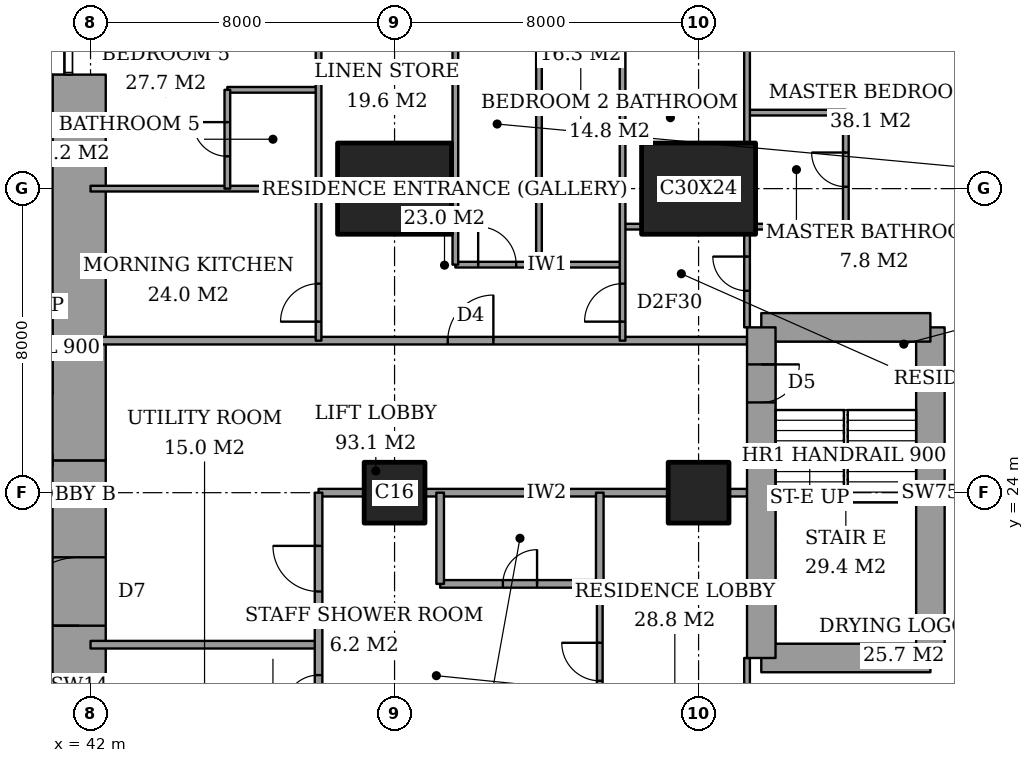
"""IFC4 building model, lengths in metres.
Left out: names, types, materials, properties, quantities, classifications, styles, units other than length and angle.
Written with IfcOpenShell. Run it as: python <this file> out.ifc"""

import sys

from ifc_helpers import new_model, si_unit, direction, frame, frame_2d, origin, origin_2d, place, context, subcontext, project, spatial, rectangle, extrude, element, fill, save


model = new_model("IFC4")
c1 = context("Model", 3, precision=1e-05, world=origin(), true_north=direction((0.0, 1.0)))
c2 = subcontext(c1, "Body", "Model", "MODEL_VIEW")
j1 = project(units=[si_unit("LENGTHUNIT", "METRE"), si_unit("PLANEANGLEUNIT", "RADIAN")], contexts=[c1])
p1 = place(None, origin())
s1 = spatial("IfcSite", under=j1, at=p1, CompositionType="ELEMENT")
p2 = place(p1, origin())
s2 = spatial("IfcBuilding", under=s1, at=p2, CompositionType="ELEMENT")
p3 = place(p2, frame((0.0, 0.0, 234.0)))
s3 = spatial("IfcBuildingStorey", under=s2, at=p3, CompositionType="ELEMENT", Elevation=234.0)
p4 = place(p3, frame((50.0, 24.0, 0.0), z_axis=(0.0, 0.0, 1.0), x_axis=(1.0, 0.0, 0.0)))
e1 = element("IfcColumn", 1, at=p4, inside=s3, PredefinedType="COLUMN", context=c2, shape_type="SweptSolid", body=[
    extrude(rectangle(XDim=1.6, YDim=1.6, at=origin_2d()), origin(), (0.0, 0.0, 1.0), 3.6),
])
p5 = place(p3, frame((50.0, 32.0, 0.0), z_axis=(0.0, 0.0, 1.0), x_axis=(1.0, 0.0, 0.0)))
e2 = element("IfcColumn", 2, at=p5, inside=s3, PredefinedType="COLUMN", context=c2, shape_type="SweptSolid", body=[
    extrude(rectangle(XDim=3.0, YDim=2.4, at=origin_2d()), origin(), (0.0, 0.0, 1.0), 3.6),
])
p6 = place(p3, frame((58.0, 24.0, 0.0), z_axis=(0.0, 0.0, 1.0), x_axis=(1.0, 0.0, 0.0)))
e3 = element("IfcColumn", 3, at=p6, inside=s3, PredefinedType="COLUMN", context=c2, shape_type="SweptSolid", body=[
    extrude(rectangle(XDim=1.6, YDim=1.6, at=origin_2d()), origin(), (0.0, 0.0, 1.0), 3.6),
])
p7 = place(p3, frame((58.0, 32.0, 0.0), z_axis=(0.0, 0.0, 1.0), x_axis=(1.0, 0.0, 0.0)))
e4 = element("IfcColumn", 4, at=p7, inside=s3, PredefinedType="COLUMN", context=c2, shape_type="SweptSolid", body=[
    extrude(rectangle(XDim=3.0, YDim=2.4, at=origin_2d()), origin(), (0.0, 0.0, 1.0), 3.6),
])
p8 = place(p3, frame((41.7, 13.0, 0.0), z_axis=(0.0, 0.0, 1.0), x_axis=(0.0, 1.0, 0.0)))
e5 = element("IfcWall", 5, at=p8, inside=s3, PredefinedType="SHEAR", context=c2, shape_type="SweptSolid", body=[
    extrude(rectangle(XDim=11.85, YDim=1.4, at=frame_2d((5.925, 0.0))), origin(), (0.0, 0.0, 1.0), 3.6),
])
p9 = place(p8, frame((7.5, 0.0, 0.0)))
e6 = element("IfcOpeningElement", 6, at=p9, cuts=e5, PredefinedType="OPENING", context=c2, shape_type="SweptSolid", body=[
    extrude(rectangle(XDim=1.8, YDim=2.4, at=frame_2d((0.9, 1.2))), frame((0.0, 0.71, 0.0), z_axis=(0.0, -1.0, 0.0), x_axis=(1.0, 0.0, 0.0)), (0.0, 0.0, 1.0), 1.42),
])
p10 = place(p3, frame((41.7, 24.85, 0.0), z_axis=(0.0, 0.0, 1.0), x_axis=(0.0, 1.0, 0.0)))
e7 = element("IfcWall", 7, at=p10, inside=s3, PredefinedType="SHEAR", context=c2, shape_type="SweptSolid", body=[
    extrude(rectangle(XDim=10.15, YDim=1.4, at=frame_2d((5.075, 0.0))), origin(), (0.0, 0.0, 1.0), 3.6),
])
p11 = place(p3, frame((59.65, 19.65, 0.0), z_axis=(0.0, 0.0, 1.0), x_axis=(1.0, 0.0, 0.0)))
e8 = element("IfcWall", 8, at=p11, inside=s3, PredefinedType="SHEAR", context=c2, shape_type="SweptSolid", body=[
    extrude(rectangle(XDim=4.45, YDim=0.75, at=frame_2d((2.225, 0.0))), origin(), (0.0, 0.0, 1.0), 3.6),
])
p12 = place(p3, frame((64.1, 19.65, 0.0), z_axis=(0.0, 0.0, 1.0), x_axis=(0.0, 1.0, 0.0)))
e9 = element("IfcWall", 9, at=p12, inside=s3, PredefinedType="SHEAR", context=c2, shape_type="SweptSolid", body=[
    extrude(rectangle(XDim=8.7, YDim=0.75, at=frame_2d((4.35, 0.0))), origin(), (0.0, 0.0, 1.0), 3.6),
])
p13 = place(p3, frame((64.1, 28.35, 0.0), z_axis=(0.0, 0.0, 1.0), x_axis=(-1.0, 0.0, 0.0)))
e10 = element("IfcWall", 10, at=p13, inside=s3, PredefinedType="SHEAR", context=c2, shape_type="SweptSolid", body=[
    extrude(rectangle(XDim=4.45, YDim=0.75, at=frame_2d((2.225, 0.0))), origin(), (0.0, 0.0, 1.0), 3.6),
])
p14 = place(p3, frame((59.65, 28.35, 0.0), z_axis=(0.0, 0.0, 1.0), x_axis=(0.0, -1.0, 0.0)))
e11 = element("IfcWall", 11, at=p14, inside=s3, PredefinedType="SHEAR", context=c2, shape_type="SweptSolid", body=[
    extrude(rectangle(XDim=8.7, YDim=0.75, at=frame_2d((4.35, 0.0))), origin(), (0.0, 0.0, 1.0), 3.6),
])
p15 = place(p14, frame((0.975, 0.0, 0.0)))
e12 = element("IfcOpeningElement", 12, at=p15, cuts=e11, PredefinedType="OPENING", context=c2, shape_type="SweptSolid", body=[
    extrude(rectangle(XDim=1.0, YDim=2.1, at=frame_2d((0.5, 1.05))), frame((0.0, 0.385, 0.0), z_axis=(0.0, -1.0, 0.0), x_axis=(1.0, 0.0, 0.0)), (0.0, 0.0, 1.0), 0.77),
])
p16 = place(p3, frame((42.0, 20.0, 0.0), z_axis=(0.0, 0.0, 1.0), x_axis=(1.0, 0.0, 0.0)))
e13 = element("IfcWall", 13, at=p16, inside=s3, PredefinedType="PARTITIONING", context=c2, shape_type="SweptSolid", body=[
    extrude(rectangle(XDim=6.0, YDim=0.2, at=frame_2d((3.0, 0.0))), origin(), (0.0, 0.0, 1.0), 3.35),
])
p17 = place(p3, frame((51.2, 21.6, 0.0), z_axis=(0.0, 0.0, 1.0), x_axis=(1.0, 0.0, 0.0)))
e14 = element("IfcWall", 14, at=p17, inside=s3, PredefinedType="PARTITIONING", context=c2, shape_type="SweptSolid", body=[
    extrude(rectangle(XDim=4.2, YDim=0.2, at=frame_2d((2.1, 0.0))), origin(), (0.0, 0.0, 1.0), 3.35),
])
p18 = place(p17, frame((1.65, 0.0, 0.0)))
e15 = element("IfcOpeningElement", 15, at=p18, cuts=e14, PredefinedType="OPENING", context=c2, shape_type="SweptSolid", body=[
    extrude(rectangle(XDim=0.9, YDim=2.1, at=frame_2d((0.45, 1.05))), frame((0.0, 0.11, 0.0), z_axis=(0.0, -1.0, 0.0), x_axis=(1.0, 0.0, 0.0)), (0.0, 0.0, 1.0), 0.22),
])
p19 = place(p3, frame((48.0, 24.0, 0.0), z_axis=(0.0, 0.0, 1.0), x_axis=(1.0, 0.0, 0.0)))
e16 = element("IfcWall", 16, at=p19, inside=s3, PredefinedType="PARTITIONING", context=c2, shape_type="SweptSolid", body=[
    extrude(rectangle(XDim=1.2, YDim=0.2, at=frame_2d((0.6, 0.0))), origin(), (0.0, 0.0, 1.0), 3.35),
])
p20 = place(p3, frame((50.8, 24.0, 0.0), z_axis=(0.0, 0.0, 1.0), x_axis=(1.0, 0.0, 0.0)))
e17 = element("IfcWall", 17, at=p20, inside=s3, PredefinedType="PARTITIONING", context=c2, shape_type="SweptSolid", body=[
    extrude(rectangle(XDim=6.4, YDim=0.2, at=frame_2d((3.2, 0.0))), origin(), (0.0, 0.0, 1.0), 3.35),
])
p21 = place(p3, frame((58.8, 24.0, 0.0), z_axis=(0.0, 0.0, 1.0), x_axis=(1.0, 0.0, 0.0)))
e18 = element("IfcWall", 18, at=p21, inside=s3, PredefinedType="PARTITIONING", context=c2, shape_type="SweptSolid", body=[
    extrude(rectangle(XDim=0.475, YDim=0.2, at=frame_2d((0.237, 0.0))), origin(), (0.0, 0.0, 1.0), 3.35),
])
p22 = place(p3, frame((64.475, 24.0, 0.0), z_axis=(0.0, 0.0, 1.0), x_axis=(1.0, 0.0, 0.0)))
e19 = element("IfcWall", 19, at=p22, inside=s3, PredefinedType="PARTITIONING", context=c2, shape_type="SweptSolid", body=[
    extrude(rectangle(XDim=0.375, YDim=0.15, at=frame_2d((0.188, 0.0))), origin(), (0.0, 0.0, 1.0), 3.35),
])
p23 = place(p3, frame((42.0, 28.0, 0.0), z_axis=(0.0, 0.0, 1.0), x_axis=(1.0, 0.0, 0.0)))
e20 = element("IfcWall", 20, at=p23, inside=s3, PredefinedType="PARTITIONING", context=c2, shape_type="SweptSolid", body=[
    extrude(rectangle(XDim=17.275, YDim=0.2, at=frame_2d((8.637, 0.0))), origin(), (0.0, 0.0, 1.0), 3.35),
])
p24 = place(p23, frame((9.4, 0.0, 0.0)))
e21 = element("IfcOpeningElement", 21, at=p24, cuts=e20, PredefinedType="OPENING", context=c2, shape_type="SweptSolid", body=[
    extrude(rectangle(XDim=1.2, YDim=2.4, at=frame_2d((0.6, 1.2))), frame((0.0, 0.11, 0.0), z_axis=(0.0, -1.0, 0.0), x_axis=(1.0, 0.0, 0.0)), (0.0, 0.0, 1.0), 0.22),
])
p25 = place(p3, frame((51.6, 30.0, 0.0), z_axis=(0.0, 0.0, 1.0), x_axis=(1.0, 0.0, 0.0)))
e22 = element("IfcWall", 22, at=p25, inside=s3, PredefinedType="PARTITIONING", context=c2, shape_type="SweptSolid", body=[
    extrude(rectangle(XDim=4.4, YDim=0.15, at=frame_2d((2.2, 0.0))), origin(), (0.0, 0.0, 1.0), 3.35),
])
p26 = place(p25, frame((0.6, 0.0, 0.0)))
e23 = element("IfcOpeningElement", 23, at=p26, cuts=e22, PredefinedType="OPENING", context=c2, shape_type="SweptSolid", body=[
    extrude(rectangle(XDim=1.0, YDim=2.1, at=frame_2d((0.5, 1.05))), frame((0.0, 0.085, 0.0), z_axis=(0.0, -1.0, 0.0), x_axis=(1.0, 0.0, 0.0)), (0.0, 0.0, 1.0), 0.17),
])
p27 = place(p3, frame((56.0, 31.0, 0.0), z_axis=(0.0, 0.0, 1.0), x_axis=(1.0, 0.0, 0.0)))
e24 = element("IfcWall", 24, at=p27, inside=s3, PredefinedType="PARTITIONING", context=c2, shape_type="SweptSolid", body=[
    extrude(rectangle(XDim=0.5, YDim=0.15, at=frame_2d((0.25, 0.0))), origin(), (0.0, 0.0, 1.0), 3.35),
])
p28 = place(p3, frame((59.5, 31.0, 0.0), z_axis=(0.0, 0.0, 1.0), x_axis=(1.0, 0.0, 0.0)))
e25 = element("IfcWall", 25, at=p28, inside=s3, PredefinedType="PARTITIONING", context=c2, shape_type="SweptSolid", body=[
    extrude(rectangle(XDim=6.95, YDim=0.15, at=frame_2d((3.475, 0.0))), origin(), (0.0, 0.0, 1.0), 3.35),
])
p29 = place(p3, frame((48.0, 31.95, 0.0), z_axis=(0.0, 0.0, 1.0), x_axis=(1.0, 0.0, 0.0)))
e26 = element("IfcWall", 26, at=p29, inside=s3, PredefinedType="PARTITIONING", context=c2, shape_type="SweptSolid", body=[
    extrude(rectangle(XDim=0.5, YDim=0.15, at=frame_2d((0.25, 0.0))), origin(), (0.0, 0.0, 1.0), 2.634),
])
p30 = place(p3, frame((42.0, 32.0, 0.0), z_axis=(0.0, 0.0, 1.0), x_axis=(1.0, 0.0, 0.0)))
e27 = element("IfcWall", 27, at=p30, inside=s3, PredefinedType="PARTITIONING", context=c2, shape_type="SweptSolid", body=[
    extrude(rectangle(XDim=6.0, YDim=0.15, at=frame_2d((3.0, 0.0))), origin(), (0.0, 0.0, 1.0), 2.634),
])
p31 = place(p3, frame((59.275, 34.0, 0.0), z_axis=(0.0, 0.0, 1.0), x_axis=(1.0, 0.0, 0.0)))
e28 = element("IfcWall", 28, at=p31, inside=s3, PredefinedType="PARTITIONING", context=c2, shape_type="SweptSolid", body=[
    extrude(rectangle(XDim=2.6, YDim=0.15, at=frame_2d((1.3, 0.0))), origin(), (0.0, 0.0, 1.0), 3.35),
])
p32 = place(p3, frame((45.6, 34.6, 0.0), z_axis=(0.0, 0.0, 1.0), x_axis=(1.0, 0.0, 0.0)))
e29 = element("IfcWall", 29, at=p32, inside=s3, PredefinedType="PARTITIONING", context=c2, shape_type="SweptSolid", body=[
    extrude(rectangle(XDim=2.4, YDim=0.15, at=frame_2d((1.2, 0.0))), origin(), (0.0, 0.0, 1.0), 3.35),
])
p33 = place(p3, frame((45.6, 32.0, 0.0), z_axis=(0.0, 0.0, 1.0), x_axis=(0.0, 1.0, 0.0)))
e30 = element("IfcWall", 30, at=p33, inside=s3, PredefinedType="PARTITIONING", context=c2, shape_type="SweptSolid", body=[
    extrude(rectangle(XDim=2.6, YDim=0.15, at=frame_2d((1.3, 0.0))), origin(), (0.0, 0.0, 1.0), 3.35),
])
p34 = place(p33, frame((0.85, 0.0, 0.0)))
e31 = element("IfcOpeningElement", 31, at=p34, cuts=e30, PredefinedType="OPENING", context=c2, shape_type="SweptSolid", body=[
    extrude(rectangle(XDim=0.9, YDim=2.1, at=frame_2d((0.45, 1.05))), frame((0.0, 0.085, 0.0), z_axis=(0.0, -1.0, 0.0), x_axis=(1.0, 0.0, 0.0)), (0.0, 0.0, 1.0), 0.17),
])
p35 = place(p3, frame((48.0, 17.5, 0.0), z_axis=(0.0, 0.0, 1.0), x_axis=(0.0, 1.0, 0.0)))
e32 = element("IfcWall", 32, at=p35, inside=s3, PredefinedType="PARTITIONING", context=c2, shape_type="SweptSolid", body=[
    extrude(rectangle(XDim=6.5, YDim=0.2, at=frame_2d((3.25, 0.0))), origin(), (0.0, 0.0, 1.0), 3.35),
])
p36 = place(p35, frame((3.9, 0.0, 0.0)))
e33 = element("IfcOpeningElement", 33, at=p36, cuts=e32, PredefinedType="OPENING", context=c2, shape_type="SweptSolid", body=[
    extrude(rectangle(XDim=1.2, YDim=2.4, at=frame_2d((0.6, 1.2))), frame((0.0, 0.11, 0.0), z_axis=(0.0, -1.0, 0.0), x_axis=(1.0, 0.0, 0.0)), (0.0, 0.0, 1.0), 0.22),
])
p37 = place(p35, frame((0.8, 0.0, 0.0)))
e34 = element("IfcOpeningElement", 34, at=p37, cuts=e32, PredefinedType="OPENING", context=c2, shape_type="SweptSolid", body=[
    extrude(rectangle(XDim=0.9, YDim=2.1, at=frame_2d((0.45, 1.05))), frame((0.0, 0.11, 0.0), z_axis=(0.0, -1.0, 0.0), x_axis=(1.0, 0.0, 0.0)), (0.0, 0.0, 1.0), 0.22),
])
p38 = place(p3, frame((48.0, 28.0, 0.0), z_axis=(0.0, 0.0, 1.0), x_axis=(0.0, 1.0, 0.0)))
e35 = element("IfcWall", 35, at=p38, inside=s3, PredefinedType="PARTITIONING", context=c2, shape_type="SweptSolid", body=[
    extrude(rectangle(XDim=9.4, YDim=0.15, at=frame_2d((4.7, 0.0))), origin(), (0.0, 0.0, 1.0), 3.35),
])
p39 = place(p38, frame((0.5, 0.0, 0.0)))
e36 = element("IfcOpeningElement", 36, at=p39, cuts=e35, PredefinedType="OPENING", context=c2, shape_type="SweptSolid", body=[
    extrude(rectangle(XDim=1.0, YDim=2.1, at=frame_2d((0.5, 1.05))), frame((0.0, 0.085, 0.0), z_axis=(0.0, -1.0, 0.0), x_axis=(1.0, 0.0, 0.0)), (0.0, 0.0, 1.0), 0.17),
])
p40 = place(p3, frame((51.2, 21.6, 0.0), z_axis=(0.0, 0.0, 1.0), x_axis=(0.0, 1.0, 0.0)))
e37 = element("IfcWall", 37, at=p40, inside=s3, PredefinedType="PARTITIONING", context=c2, shape_type="SweptSolid", body=[
    extrude(rectangle(XDim=2.4, YDim=0.2, at=frame_2d((1.2, 0.0))), origin(), (0.0, 0.0, 1.0), 3.35),
])
for number, where, z_axis, x_axis in (
    (38, (51.6, 30.0, 0.0), (0.0, 0.0, 1.0), (0.0, 1.0, 0.0)),
    (39, (53.8, 30.0, 0.0), (0.0, 0.0, 1.0), (0.0, 1.0, 0.0)),
):
    element("IfcWall", number, at=place(p3, frame(where, z_axis=z_axis, x_axis=x_axis)), inside=s3, PredefinedType="PARTITIONING", context=c2, shape_type="SweptSolid", body=[
        extrude(rectangle(XDim=7.4, YDim=0.15, at=frame_2d((3.7, 0.0))), origin(), (0.0, 0.0, 1.0), 3.35),
    ])
p41 = place(p3, frame((55.4, 21.6, 0.0), z_axis=(0.0, 0.0, 1.0), x_axis=(0.0, 1.0, 0.0)))
e40 = element("IfcWall", 40, at=p41, inside=s3, PredefinedType="PARTITIONING", context=c2, shape_type="SweptSolid", body=[
    extrude(rectangle(XDim=2.4, YDim=0.2, at=frame_2d((1.2, 0.0))), origin(), (0.0, 0.0, 1.0), 3.35),
])
p42 = place(p3, frame((55.4, 11.0, 0.0), z_axis=(0.0, 0.0, 1.0), x_axis=(0.0, 1.0, 0.0)))
e41 = element("IfcWall", 41, at=p42, inside=s3, PredefinedType="PARTITIONING", context=c2, shape_type="SweptSolid", body=[
    extrude(rectangle(XDim=10.6, YDim=0.15, at=frame_2d((5.3, 0.0))), origin(), (0.0, 0.0, 1.0), 3.35),
])
p43 = place(p42, frame((8.05, 0.0, 0.0)))
e42 = element("IfcOpeningElement", 42, at=p43, cuts=e41, PredefinedType="OPENING", context=c2, shape_type="SweptSolid", body=[
    extrude(rectangle(XDim=1.0, YDim=2.1, at=frame_2d((0.5, 1.05))), frame((0.0, 0.085, 0.0), z_axis=(0.0, -1.0, 0.0), x_axis=(1.0, 0.0, 0.0)), (0.0, 0.0, 1.0), 0.17),
])
p44 = place(p3, frame((56.0, 28.0, 0.0), z_axis=(0.0, 0.0, 1.0), x_axis=(0.0, 1.0, 0.0)))
e43 = element("IfcWall", 43, at=p44, inside=s3, PredefinedType="PARTITIONING", context=c2, shape_type="SweptSolid", body=[
    extrude(rectangle(XDim=9.4, YDim=0.15, at=frame_2d((4.7, 0.0))), origin(), (0.0, 0.0, 1.0), 3.35),
])
p45 = place(p44, frame((0.5, 0.0, 0.0)))
e44 = element("IfcOpeningElement", 44, at=p45, cuts=e43, PredefinedType="OPENING", context=c2, shape_type="SweptSolid", body=[
    extrude(rectangle(XDim=1.0, YDim=2.1, at=frame_2d((0.5, 1.05))), frame((0.0, 0.085, 0.0), z_axis=(0.0, -1.0, 0.0), x_axis=(1.0, 0.0, 0.0)), (0.0, 0.0, 1.0), 0.17),
])
p46 = place(p3, frame((59.275, 17.2, 0.0), z_axis=(0.0, 0.0, 1.0), x_axis=(0.0, 1.0, 0.0)))
e45 = element("IfcWall", 45, at=p46, inside=s3, PredefinedType="PARTITIONING", context=c2, shape_type="SweptSolid", body=[
    extrude(rectangle(XDim=2.45, YDim=0.15, at=frame_2d((1.225, 0.0))), origin(), (0.0, 0.0, 1.0), 3.35),
])
p47 = place(p46, frame((0.587, 0.0, 0.0)))
e46 = element("IfcOpeningElement", 46, at=p47, cuts=e45, PredefinedType="OPENING", context=c2, shape_type="SweptSolid", body=[
    extrude(rectangle(XDim=0.9, YDim=2.1, at=frame_2d((0.45, 1.05))), frame((0.0, 0.085, 0.0), z_axis=(0.0, -1.0, 0.0), x_axis=(1.0, 0.0, 0.0)), (0.0, 0.0, 1.0), 0.17),
])
p48 = place(p3, frame((59.275, 28.35, 0.0), z_axis=(0.0, 0.0, 1.0), x_axis=(0.0, 1.0, 0.0)))
e47 = element("IfcWall", 47, at=p48, inside=s3, PredefinedType="PARTITIONING", context=c2, shape_type="SweptSolid", body=[
    extrude(rectangle(XDim=2.45, YDim=0.15, at=frame_2d((1.225, 0.0))), origin(), (0.0, 0.0, 1.0), 3.35),
])
p49 = place(p48, frame((0.962, 0.0, 0.0)))
e48 = element("IfcOpeningElement", 48, at=p49, cuts=e47, PredefinedType="OPENING", context=c2, shape_type="SweptSolid", body=[
    extrude(rectangle(XDim=0.9, YDim=2.1, at=frame_2d((0.45, 1.05))), frame((0.0, 0.085, 0.0), z_axis=(0.0, -1.0, 0.0), x_axis=(1.0, 0.0, 0.0)), (0.0, 0.0, 1.0), 0.17),
])
p50 = place(p3, frame((59.275, 33.2, 0.0), z_axis=(0.0, 0.0, 1.0), x_axis=(0.0, 1.0, 0.0)))
e49 = element("IfcWall", 49, at=p50, inside=s3, PredefinedType="PARTITIONING", context=c2, shape_type="SweptSolid", body=[
    extrude(rectangle(XDim=4.2, YDim=0.15, at=frame_2d((2.1, 0.0))), origin(), (0.0, 0.0, 1.0), 3.35),
])
p51 = place(p3, frame((61.875, 31.0, 0.0), z_axis=(0.0, 0.0, 1.0), x_axis=(0.0, 1.0, 0.0)))
e50 = element("IfcWall", 50, at=p51, inside=s3, PredefinedType="PARTITIONING", context=c2, shape_type="SweptSolid", body=[
    extrude(rectangle(XDim=3.0, YDim=0.15, at=frame_2d((1.5, 0.0))), origin(), (0.0, 0.0, 1.0), 3.35),
])
p52 = place(p51, frame((1.05, 0.0, 0.0)))
e51 = element("IfcOpeningElement", 51, at=p52, cuts=e50, PredefinedType="OPENING", context=c2, shape_type="SweptSolid", body=[
    extrude(rectangle(XDim=0.9, YDim=2.1, at=frame_2d((0.45, 1.05))), frame((0.0, 0.085, 0.0), z_axis=(0.0, -1.0, 0.0), x_axis=(1.0, 0.0, 0.0)), (0.0, 0.0, 1.0), 0.17),
])
p53 = place(p43, origin())
e52 = element("IfcDoor", 52, at=p53, inside=s3, OperationType="SINGLE_SWING_LEFT", PredefinedType="DOOR", context=c2, shape_type="SweptSolid", body=[
    extrude(rectangle(XDim=1.0, YDim=2.1, at=frame_2d((0.5, 1.05))), frame((0.0, 0.025, 0.0), z_axis=(0.0, -1.0, 0.0), x_axis=(1.0, 0.0, 0.0)), (0.0, 0.0, 1.0), 0.05),
])
fill(e42, e52)
p54 = place(p18, origin())
e53 = element("IfcDoor", 53, at=p54, inside=s3, OperationType="SINGLE_SWING_LEFT", PredefinedType="DOOR", context=c2, shape_type="SweptSolid", body=[
    extrude(rectangle(XDim=0.9, YDim=2.1, at=frame_2d((0.45, 1.05))), frame((0.0, 0.025, 0.0), z_axis=(0.0, -1.0, 0.0), x_axis=(1.0, 0.0, 0.0)), (0.0, 0.0, 1.0), 0.05),
])
fill(e15, e53)
p55 = place(p36, origin())
e54 = element("IfcDoor", 54, at=p55, inside=s3, OperationType="SINGLE_SWING_LEFT", PredefinedType="DOOR", context=c2, shape_type="SweptSolid", body=[
    extrude(rectangle(XDim=1.2, YDim=2.4, at=frame_2d((0.6, 1.2))), frame((0.0, 0.025, 0.0), z_axis=(0.0, -1.0, 0.0), x_axis=(1.0, 0.0, 0.0)), (0.0, 0.0, 1.0), 0.05),
])
fill(e33, e54)
p56 = place(p37, origin())
e55 = element("IfcDoor", 55, at=p56, inside=s3, OperationType="SINGLE_SWING_RIGHT", PredefinedType="DOOR", context=c2, shape_type="SweptSolid", body=[
    extrude(rectangle(XDim=0.9, YDim=2.1, at=frame_2d((0.45, 1.05))), frame((0.0, 0.025, 0.0), z_axis=(0.0, -1.0, 0.0), x_axis=(1.0, 0.0, 0.0)), (0.0, 0.0, 1.0), 0.05),
])
fill(e34, e55)
p57 = place(p52, origin())
e56 = element("IfcDoor", 56, at=p57, inside=s3, OperationType="SINGLE_SWING_LEFT", PredefinedType="DOOR", context=c2, shape_type="SweptSolid", body=[
    extrude(rectangle(XDim=0.9, YDim=2.1, at=frame_2d((0.45, 1.05))), frame((0.0, 0.025, 0.0), z_axis=(0.0, -1.0, 0.0), x_axis=(1.0, 0.0, 0.0)), (0.0, 0.0, 1.0), 0.05),
])
fill(e51, e56)
p58 = place(p49, origin())
e57 = element("IfcDoor", 57, at=p58, inside=s3, OperationType="SINGLE_SWING_LEFT", PredefinedType="DOOR", context=c2, shape_type="SweptSolid", body=[
    extrude(rectangle(XDim=0.9, YDim=2.1, at=frame_2d((0.45, 1.05))), frame((0.0, 0.025, 0.0), z_axis=(0.0, -1.0, 0.0), x_axis=(1.0, 0.0, 0.0)), (0.0, 0.0, 1.0), 0.05),
])
fill(e48, e57)
p59 = place(p45, origin())
e58 = element("IfcDoor", 58, at=p59, inside=s3, OperationType="SINGLE_SWING_RIGHT", PredefinedType="DOOR", context=c2, shape_type="SweptSolid", body=[
    extrude(rectangle(XDim=1.0, YDim=2.1, at=frame_2d((0.5, 1.05))), frame((0.0, 0.025, 0.0), z_axis=(0.0, -1.0, 0.0), x_axis=(1.0, 0.0, 0.0)), (0.0, 0.0, 1.0), 0.05),
])
fill(e44, e58)
p60 = place(p24, origin())
e59 = element("IfcDoor", 59, at=p60, inside=s3, OperationType="SINGLE_SWING_LEFT", PredefinedType="DOOR", context=c2, shape_type="SweptSolid", body=[
    extrude(rectangle(XDim=1.2, YDim=2.4, at=frame_2d((0.6, 1.2))), frame((0.0, 0.025, 0.0), z_axis=(0.0, -1.0, 0.0), x_axis=(1.0, 0.0, 0.0)), (0.0, 0.0, 1.0), 0.05),
])
fill(e21, e59)
p61 = place(p26, origin())
e60 = element("IfcDoor", 60, at=p61, inside=s3, OperationType="SINGLE_SWING_RIGHT", PredefinedType="DOOR", context=c2, shape_type="SweptSolid", body=[
    extrude(rectangle(XDim=1.0, YDim=2.1, at=frame_2d((0.5, 1.05))), frame((0.0, 0.025, 0.0), z_axis=(0.0, -1.0, 0.0), x_axis=(1.0, 0.0, 0.0)), (0.0, 0.0, 1.0), 0.05),
])
fill(e23, e60)
p62 = place(p34, origin())
e61 = element("IfcDoor", 61, at=p62, inside=s3, OperationType="SINGLE_SWING_LEFT", PredefinedType="DOOR", context=c2, shape_type="SweptSolid", body=[
    extrude(rectangle(XDim=0.9, YDim=2.1, at=frame_2d((0.45, 1.05))), frame((0.0, 0.025, 0.0), z_axis=(0.0, -1.0, 0.0), x_axis=(1.0, 0.0, 0.0)), (0.0, 0.0, 1.0), 0.05),
])
fill(e31, e61)
p63 = place(p39, origin())
e62 = element("IfcDoor", 62, at=p63, inside=s3, OperationType="SINGLE_SWING_RIGHT", PredefinedType="DOOR", context=c2, shape_type="SweptSolid", body=[
    extrude(rectangle(XDim=1.0, YDim=2.1, at=frame_2d((0.5, 1.05))), frame((0.0, 0.025, 0.0), z_axis=(0.0, -1.0, 0.0), x_axis=(1.0, 0.0, 0.0)), (0.0, 0.0, 1.0), 0.05),
])
fill(e36, e62)
p64 = place(p9, origin())
e63 = element("IfcDoor", 63, at=p64, inside=s3, OperationType="DOUBLE_DOOR_DOUBLE_SWING", PredefinedType="DOOR", context=c2, shape_type="SweptSolid", body=[
    extrude(rectangle(XDim=1.8, YDim=2.4, at=frame_2d((0.9, 1.2))), frame((0.0, 0.025, 0.0), z_axis=(0.0, -1.0, 0.0), x_axis=(1.0, 0.0, 0.0)), (0.0, 0.0, 1.0), 0.05),
])
fill(e6, e63)
p65 = place(p15, origin())
e64 = element("IfcDoor", 64, at=p65, inside=s3, OperationType="SINGLE_SWING_RIGHT", PredefinedType="DOOR", context=c2, shape_type="SweptSolid", body=[
    extrude(rectangle(XDim=1.0, YDim=2.1, at=frame_2d((0.5, 1.05))), frame((0.0, 0.025, 0.0), z_axis=(0.0, -1.0, 0.0), x_axis=(1.0, 0.0, 0.0)), (0.0, 0.0, 1.0), 0.05),
])
fill(e12, e64)
save(model, sys.argv[1])
